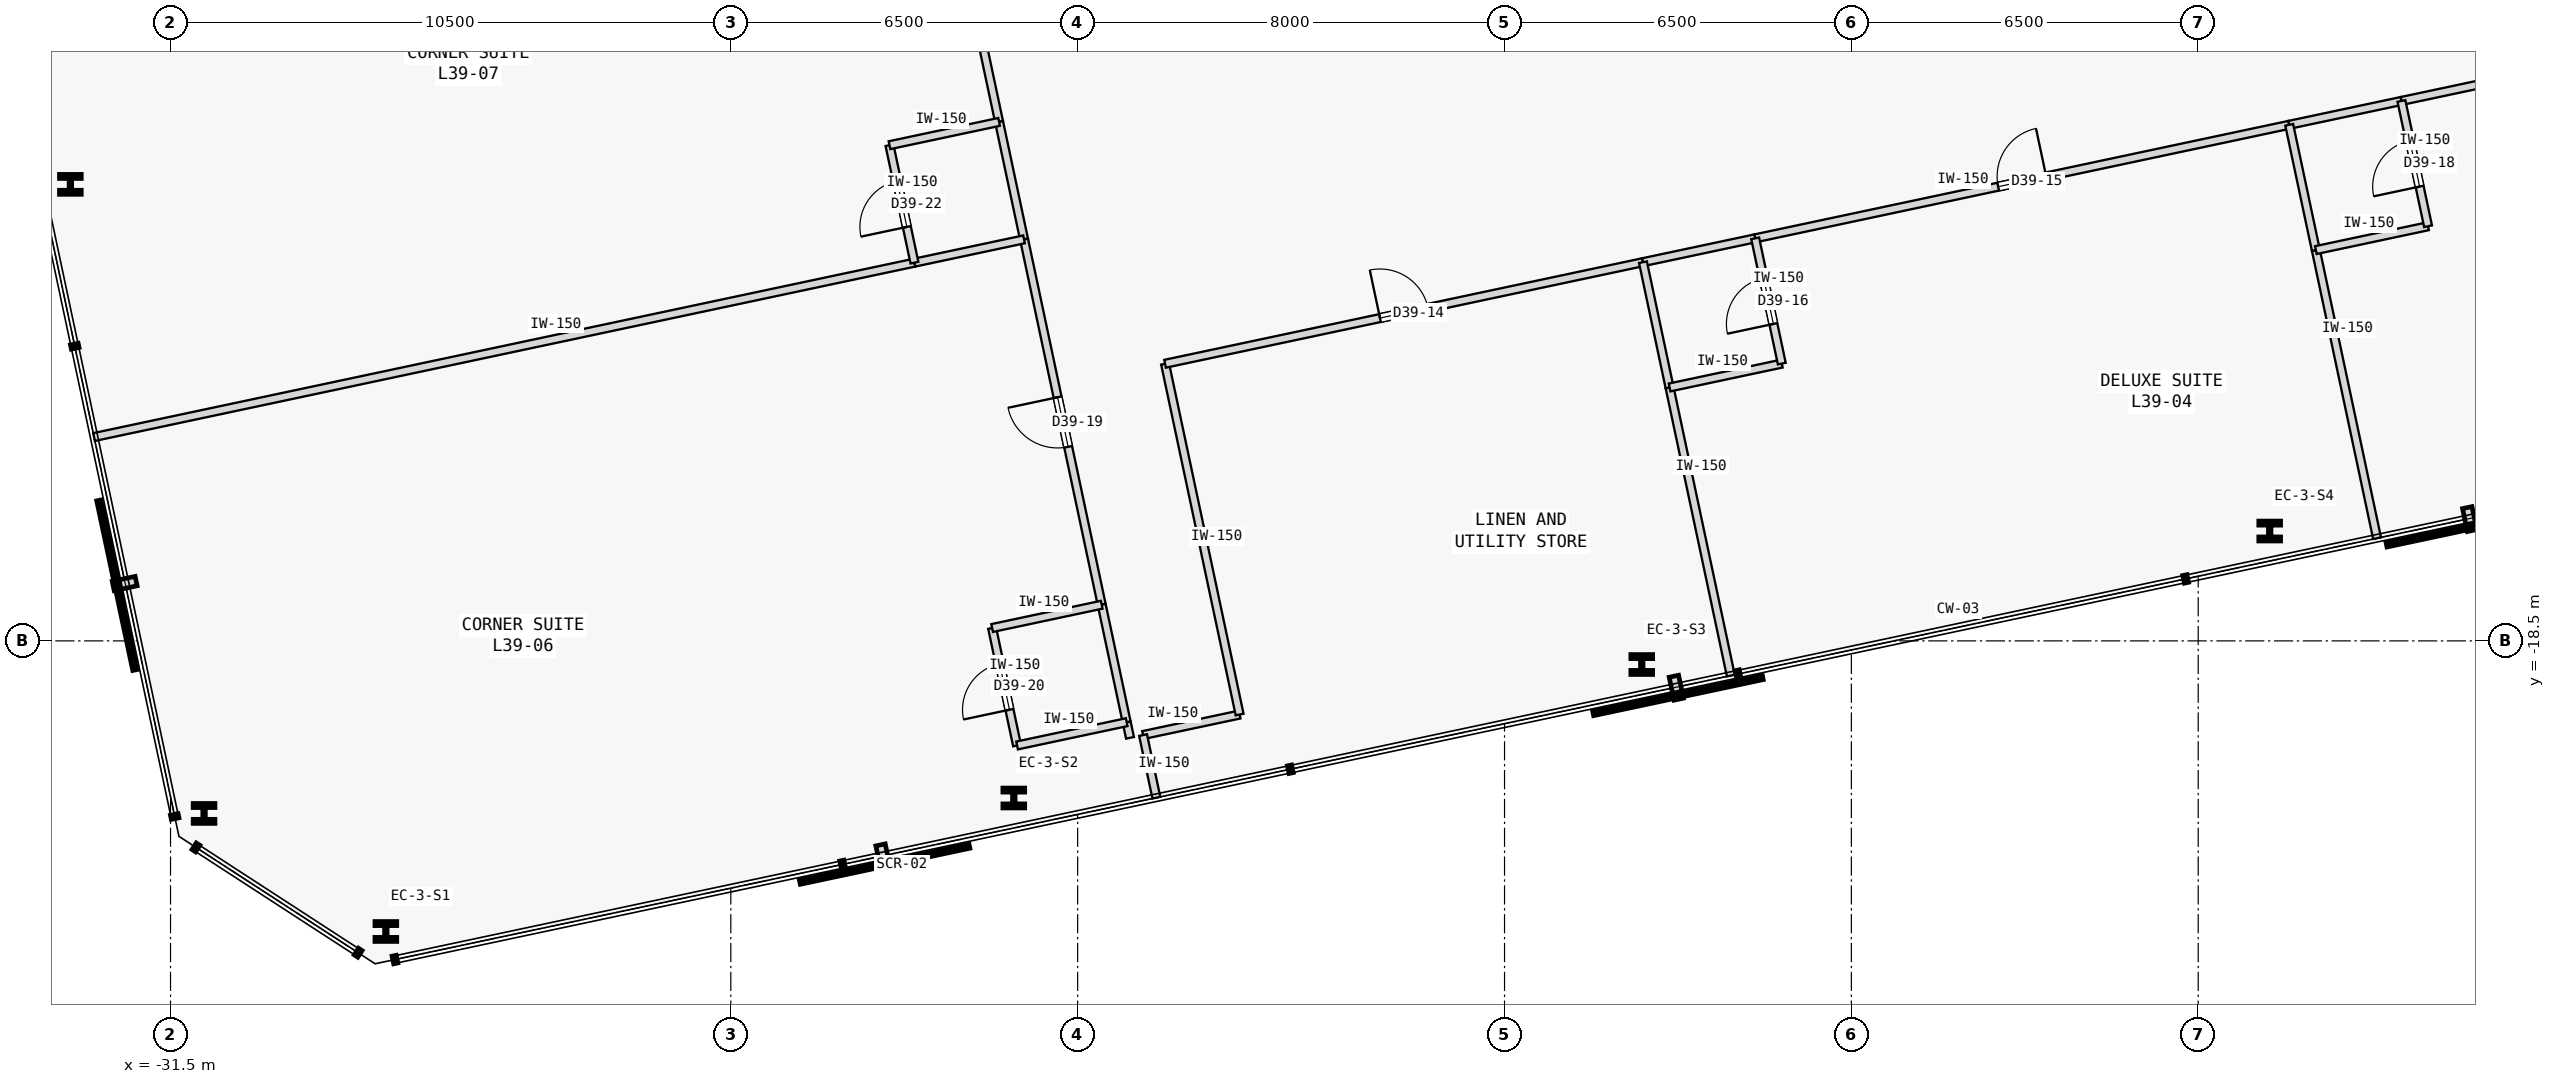
"""IFC4 building model, lengths in metres.
Left out: names, types, materials, properties, quantities, classifications, styles, units other than length and angle.
Written with IfcOpenShell. Run it as: python <this file> out.ifc"""

import sys

from ifc_helpers import new_model, si_unit, direction, frame, frame_2d, origin, origin_2d, place, context, subcontext, project, spatial, rectangle, i_section, extrude, element, fill, save


model = new_model("IFC4")
c1 = context("Model", 3, precision=1e-05, world=origin(), true_north=direction((0.0, 1.0)))
c2 = subcontext(c1, "Body", "Model", "MODEL_VIEW")
j1 = project(units=[si_unit("LENGTHUNIT", "METRE"), si_unit("PLANEANGLEUNIT", "RADIAN")], contexts=[c1])
p1 = place(None, origin())
s1 = spatial("IfcSite", under=j1, at=p1, CompositionType="ELEMENT")
p2 = place(p1, origin())
s2 = spatial("IfcBuilding", under=s1, at=p2, CompositionType="ELEMENT")
p3 = place(p2, frame((0.0, 0.0, 154.8)))
s3 = spatial("IfcBuildingStorey", under=s2, at=p3, CompositionType="ELEMENT", Elevation=154.8)
for number, where, z_axis, x_axis in (
    (1, (-27.465, -23.946, 0.0), (0.0, 0.0, 1.0), (1.0, 0.0, 0.0)),
    (2, (-15.697, -21.444, 0.0), (0.0, 0.0, 1.0), (1.0, 0.0, 0.0)),
    (3, (-3.928, -18.943, 0.0), (0.0, 0.0, 1.0), (1.0, 0.0, 0.0)),
    (4, (7.84, -16.441, 0.0), (0.0, 0.0, 1.0), (1.0, 0.0, 0.0)),
    (5, (-33.377, -9.945, 0.0), (0.0, 0.0, 1.0), (1.0, 0.0, 0.0)),
    (6, (-30.871, -21.733, 0.0), (0.0, 0.0, 1.0), (1.0, 0.0, 0.0)),
):
    element("IfcColumn", number, at=place(p3, frame(where, z_axis=z_axis, x_axis=x_axis)), inside=s3, PredefinedType="COLUMN", context=c2, shape_type="SweptSolid", body=[
        extrude(i_section(OverallWidth=0.409, OverallDepth=0.374, WebThickness=0.048, FlangeThickness=0.077, FilletRadius=0.015, at=origin_2d()), origin(), (0.0, 0.0, 1.0), 3.4),
    ])
p4 = place(p3, frame((-13.274, -20.265, 0.0), z_axis=(0.0, 0.0, 1.0), x_axis=(0.978160192495, 0.207852442415, 0.0)))
e7 = element("IfcWall", 7, at=p4, inside=s3, PredefinedType="PARTITIONING", context=c2, shape_type="SweptSolid", body=[
    extrude(rectangle(XDim=1.85, YDim=0.15, at=frame_2d((0.925, 0.0))), origin(), (0.0, 0.0, 1.0), 3.175),
])
p5 = place(p3, frame((-11.465, -19.88, 0.0), z_axis=(0.0, 0.0, 1.0), x_axis=(-0.207916109912, 0.978146661416, 0.0)))
e8 = element("IfcWall", 8, at=p5, inside=s3, PredefinedType="PARTITIONING", context=c2, shape_type="SweptSolid", body=[
    extrude(rectangle(XDim=6.72, YDim=0.15, at=frame_2d((3.36, 0.0))), origin(), (0.0, 0.0, 1.0), 3.175),
])
p6 = place(p3, frame((-12.862, -13.307, 0.0), z_axis=(0.0, 0.0, 1.0), x_axis=(0.978149904805, 0.207900850719, 0.0)))
e9 = element("IfcWall", 9, at=p6, inside=s3, PredefinedType="PARTITIONING", context=c2, shape_type="SweptSolid", body=[
    extrude(rectangle(XDim=9.156, YDim=0.15, at=frame_2d((4.578, 0.0))), origin(), (0.0, 0.0, 1.0), 3.175),
])
p7 = place(p6, frame((4.118, 0.0, 0.0)))
e10 = element("IfcOpeningElement", 10, at=p7, cuts=e9, PredefinedType="OPENING", context=c2, shape_type="SweptSolid", body=[
    extrude(rectangle(XDim=0.92, YDim=2.15, at=frame_2d((0.46, 1.075))), frame((0.0, 0.085, 0.0), z_axis=(0.0, -1.0, 0.0), x_axis=(1.0, 0.0, 0.0)), (0.0, 0.0, 1.0), 0.17),
])
p8 = place(p3, frame((-1.803, -10.957, 0.0), z_axis=(0.0, 0.0, 1.0), x_axis=(0.978145386425, 0.207922108048, 0.0)))
e11 = element("IfcWall", 11, at=p8, inside=s3, PredefinedType="PARTITIONING", context=c2, shape_type="SweptSolid", body=[
    extrude(rectangle(XDim=10.232, YDim=0.15, at=frame_2d((5.116, 0.0))), origin(), (0.0, 0.0, 1.0), 3.175),
])
p9 = place(p8, frame((4.656, 0.0, 0.0)))
e12 = element("IfcOpeningElement", 12, at=p9, cuts=e11, PredefinedType="OPENING", context=c2, shape_type="SweptSolid", body=[
    extrude(rectangle(XDim=0.92, YDim=2.15, at=frame_2d((0.46, 1.075))), frame((0.0, 0.085, 0.0), z_axis=(0.0, -1.0, 0.0), x_axis=(1.0, 0.0, 0.0)), (0.0, 0.0, 1.0), 0.17),
])
p10 = place(p3, frame((-3.906, -11.404, 0.0), z_axis=(0.0, 0.0, 1.0), x_axis=(0.978146728319, 0.207915795165, 0.0)))
e13 = element("IfcWall", 13, at=p10, inside=s3, PredefinedType="PARTITIONING", context=c2, shape_type="SweptSolid", body=[
    extrude(rectangle(XDim=2.15, YDim=0.15, at=frame_2d((1.075, 0.0))), origin(), (0.0, 0.0, 1.0), 3.175),
])
p11 = place(p3, frame((10.309, -8.382, 0.0), z_axis=(0.0, 0.0, 1.0), x_axis=(0.978149817889, 0.207901259648, 0.0)))
e14 = element("IfcWall", 14, at=p11, inside=s3, PredefinedType="PARTITIONING", context=c2, shape_type="SweptSolid", body=[
    extrude(rectangle(XDim=7.007, YDim=0.15, at=frame_2d((3.503, 0.0))), origin(), (0.0, 0.0, 1.0), 3.175),
])
p12 = place(p11, frame((3.043, 0.0, 0.0)))
e15 = element("IfcOpeningElement", 15, at=p12, cuts=e14, PredefinedType="OPENING", context=c2, shape_type="SweptSolid", body=[
    extrude(rectangle(XDim=0.92, YDim=2.15, at=frame_2d((0.46, 1.075))), frame((0.0, 0.085, 0.0), z_axis=(0.0, -1.0, 0.0), x_axis=(1.0, 0.0, 0.0)), (0.0, 0.0, 1.0), 0.17),
])
p13 = place(p3, frame((8.206, -8.829, 0.0), z_axis=(0.0, 0.0, 1.0), x_axis=(0.978146728319, 0.207915795165, 0.0)))
e16 = element("IfcWall", 16, at=p13, inside=s3, PredefinedType="PARTITIONING", context=c2, shape_type="SweptSolid", body=[
    extrude(rectangle(XDim=2.15, YDim=0.15, at=frame_2d((1.075, 0.0))), origin(), (0.0, 0.0, 1.0), 3.175),
])
p14 = place(p3, frame((-13.519, -20.317, 0.0), z_axis=(0.0, 0.0, 1.0), x_axis=(-0.207527808066, 0.978229118806, 0.0)))
e17 = element("IfcWall", 17, at=p14, inside=s3, PredefinedType="PARTITIONING", context=c2, shape_type="SweptSolid", body=[
    extrude(rectangle(XDim=0.3, YDim=0.15, at=frame_2d((0.15, 0.0))), origin(), (0.0, 0.0, 1.0), 3.175),
])
p15 = place(p3, frame((-14.049, -17.823, 0.0), z_axis=(0.0, 0.0, 1.0), x_axis=(-0.207940096132, 0.978141562567, 0.0)))
e18 = element("IfcWall", 18, at=p15, inside=s3, PredefinedType="PARTITIONING", context=c2, shape_type="SweptSolid", body=[
    extrude(rectangle(XDim=7.0, YDim=0.15, at=frame_2d((3.5, 0.0))), origin(), (0.0, 0.0, 1.0), 3.175),
])
p16 = place(p15, frame((3.025, 0.0, 0.0)))
e19 = element("IfcOpeningElement", 19, at=p16, cuts=e18, PredefinedType="OPENING", context=c2, shape_type="SweptSolid", body=[
    extrude(rectangle(XDim=0.95, YDim=2.15, at=frame_2d((0.475, 1.075))), frame((0.0, 0.085, 0.0), z_axis=(0.0, -1.0, 0.0), x_axis=(1.0, 0.0, 0.0)), (0.0, 0.0, 1.0), 0.17),
])
p17 = place(p3, frame((-13.581, -20.023, 0.0), z_axis=(0.0, 0.0, 1.0), x_axis=(-0.207891197838, 0.978151956427, 0.0)))
e20 = element("IfcWall", 20, at=p17, inside=s3, PredefinedType="PARTITIONING", context=c2, shape_type="SweptSolid", body=[
    extrude(rectangle(XDim=2.25, YDim=0.15, at=frame_2d((1.125, 0.0))), origin(), (0.0, 0.0, 1.0), 3.175),
])
p18 = place(p3, frame((-15.972, -8.775, 0.0), z_axis=(0.0, 0.0, 1.0), x_axis=(-0.207894825434, 0.97815118543, 0.0)))
e21 = element("IfcWall", 21, at=p18, inside=s3, PredefinedType="PARTITIONING", context=c2, shape_type="SweptSolid", body=[
    extrude(rectangle(XDim=8.5, YDim=0.15, at=frame_2d((4.25, 0.0))), origin(), (0.0, 0.0, 1.0), 3.175),
])
p19 = place(p18, frame((5.05, 0.0, 0.0)))
e22 = element("IfcOpeningElement", 22, at=p19, cuts=e21, PredefinedType="OPENING", context=c2, shape_type="SweptSolid", body=[
    extrude(rectangle(XDim=0.95, YDim=2.15, at=frame_2d((0.475, 1.075))), frame((0.0, 0.085, 0.0), z_axis=(0.0, -1.0, 0.0), x_axis=(1.0, 0.0, 0.0)), (0.0, 0.0, 1.0), 0.17),
])
p20 = place(p3, frame((-15.504, -10.976, 0.0), z_axis=(0.0, 0.0, 1.0), x_axis=(-0.207891197838, 0.978151956427, 0.0)))
e23 = element("IfcWall", 23, at=p20, inside=s3, PredefinedType="PARTITIONING", context=c2, shape_type="SweptSolid", body=[
    extrude(rectangle(XDim=2.25, YDim=0.15, at=frame_2d((1.125, 0.0))), origin(), (0.0, 0.0, 1.0), 3.175),
])
p21 = place(p3, frame((-2.259, -19.15, 0.0), z_axis=(0.0, 0.0, 1.0), x_axis=(-0.20791588359, 0.978146709523, 0.0)))
e24 = element("IfcWall", 24, at=p21, inside=s3, PredefinedType="PARTITIONING", context=c2, shape_type="SweptSolid", body=[
    extrude(rectangle(XDim=5.52, YDim=0.15, at=frame_2d((2.76, 0.0))), origin(), (0.0, 0.0, 1.0), 3.175),
])
p22 = place(p3, frame((-3.407, -13.751, 0.0), z_axis=(0.0, 0.0, 1.0), x_axis=(-0.207840504985, 0.978162729042, 0.0)))
e25 = element("IfcWall", 25, at=p22, inside=s3, PredefinedType="PARTITIONING", context=c2, shape_type="SweptSolid", body=[
    extrude(rectangle(XDim=2.4, YDim=0.15, at=frame_2d((1.2, 0.0))), origin(), (0.0, 0.0, 1.0), 3.175),
])
p23 = place(p3, frame((-13.025, -21.439, 0.0), z_axis=(0.0, 0.0, 1.0), x_axis=(-0.207917150959, 0.978146440129, 0.0)))
e26 = element("IfcWall", 26, at=p23, inside=s3, PredefinedType="PARTITIONING", context=c2, shape_type="SweptSolid", body=[
    extrude(rectangle(XDim=1.2, YDim=0.15, at=frame_2d((0.6, 0.0))), origin(), (0.0, 0.0, 1.0), 3.175),
])
p24 = place(p3, frame((-3.407, -13.751, 0.0), z_axis=(0.0, 0.0, 1.0), x_axis=(0.978151636287, 0.207892704126, 0.0)))
e27 = element("IfcWall", 27, at=p24, inside=s3, PredefinedType="PARTITIONING", context=c2, shape_type="SweptSolid", body=[
    extrude(rectangle(XDim=2.15, YDim=0.15, at=frame_2d((1.075, 0.0))), origin(), (0.0, 0.0, 1.0), 3.175),
])
p25 = place(p3, frame((-1.304, -13.304, 0.0), z_axis=(0.0, 0.0, 1.0), x_axis=(-0.207937840262, 0.978142042133, 0.0)))
e28 = element("IfcWall", 28, at=p25, inside=s3, PredefinedType="PARTITIONING", context=c2, shape_type="SweptSolid", body=[
    extrude(rectangle(XDim=2.4, YDim=0.15, at=frame_2d((1.2, 0.0))), origin(), (0.0, 0.0, 1.0), 3.175),
])
p26 = place(p25, frame((0.76, 0.0, 0.0)))
e29 = element("IfcOpeningElement", 29, at=p26, cuts=e28, PredefinedType="OPENING", context=c2, shape_type="SweptSolid", body=[
    extrude(rectangle(XDim=0.88, YDim=2.15, at=frame_2d((0.44, 1.075))), frame((0.0, 0.085, 0.0), z_axis=(0.0, -1.0, 0.0), x_axis=(1.0, 0.0, 0.0)), (0.0, 0.0, 1.0), 0.17),
])
p27 = place(p3, frame((9.852, -16.576, 0.0), z_axis=(0.0, 0.0, 1.0), x_axis=(-0.20792487872, 0.978144797466, 0.0)))
e30 = element("IfcWall", 30, at=p27, inside=s3, PredefinedType="PARTITIONING", context=c2, shape_type="SweptSolid", body=[
    extrude(rectangle(XDim=5.52, YDim=0.15, at=frame_2d((2.76, 0.0))), origin(), (0.0, 0.0, 1.0), 3.175),
])
p28 = place(p3, frame((8.705, -11.177, 0.0), z_axis=(0.0, 0.0, 1.0), x_axis=(-0.207917150959, 0.978146440129, 0.0)))
e31 = element("IfcWall", 31, at=p28, inside=s3, PredefinedType="PARTITIONING", context=c2, shape_type="SweptSolid", body=[
    extrude(rectangle(XDim=2.4, YDim=0.15, at=frame_2d((1.2, 0.0))), origin(), (0.0, 0.0, 1.0), 3.175),
])
p29 = place(p3, frame((8.705, -11.177, 0.0), z_axis=(0.0, 0.0, 1.0), x_axis=(0.978123629285, 0.208024435669, 0.0)))
e32 = element("IfcWall", 32, at=p29, inside=s3, PredefinedType="PARTITIONING", context=c2, shape_type="SweptSolid", body=[
    extrude(rectangle(XDim=2.15, YDim=0.15, at=frame_2d((1.075, 0.0))), origin(), (0.0, 0.0, 1.0), 3.175),
])
p30 = place(p3, frame((10.808, -10.729, 0.0), z_axis=(0.0, 0.0, 1.0), x_axis=(-0.207937840262, 0.978142042133, 0.0)))
e33 = element("IfcWall", 33, at=p30, inside=s3, PredefinedType="PARTITIONING", context=c2, shape_type="SweptSolid", body=[
    extrude(rectangle(XDim=2.4, YDim=0.15, at=frame_2d((1.2, 0.0))), origin(), (0.0, 0.0, 1.0), 3.175),
])
p31 = place(p30, frame((0.76, 0.0, 0.0)))
e34 = element("IfcOpeningElement", 34, at=p31, cuts=e33, PredefinedType="OPENING", context=c2, shape_type="SweptSolid", body=[
    extrude(rectangle(XDim=0.88, YDim=2.15, at=frame_2d((0.44, 1.075))), frame((0.0, 0.085, 0.0), z_axis=(0.0, -1.0, 0.0), x_axis=(1.0, 0.0, 0.0)), (0.0, 0.0, 1.0), 0.17),
])
p32 = place(p3, frame((-15.635, -20.46, 0.0), z_axis=(0.0, 0.0, 1.0), x_axis=(-0.207913264065, 0.978147266328, 0.0)))
e35 = element("IfcWall", 35, at=p32, inside=s3, PredefinedType="PARTITIONING", context=c2, shape_type="SweptSolid", body=[
    extrude(rectangle(XDim=2.25, YDim=0.15, at=frame_2d((1.125, 0.0))), origin(), (0.0, 0.0, 1.0), 3.175),
])
p33 = place(p32, frame((0.685, 0.0, 0.0)))
e36 = element("IfcOpeningElement", 36, at=p33, cuts=e35, PredefinedType="OPENING", context=c2, shape_type="SweptSolid", body=[
    extrude(rectangle(XDim=0.88, YDim=2.15, at=frame_2d((0.44, 1.075))), frame((0.0, 0.085, 0.0), z_axis=(0.0, -1.0, 0.0), x_axis=(1.0, 0.0, 0.0)), (0.0, 0.0, 1.0), 0.17),
])
for number, where, z_axis, x_axis in (
    (37, (-15.635, -20.46, 0.0), (0.0, 0.0, 1.0), (0.978, 0.208, 0.0)),
    (38, (-16.103, -18.259, 0.0), (0.0, 0.0, 1.0), (0.978, 0.208, 0.0)),
):
    element("IfcWall", number, at=place(p3, frame(where, z_axis=z_axis, x_axis=x_axis)), inside=s3, PredefinedType="PARTITIONING", context=c2, shape_type="SweptSolid", body=[
        extrude(rectangle(XDim=2.1, YDim=0.15, at=frame_2d((1.05, 0.0))), origin(), (0.0, 0.0, 1.0), 3.175),
    ])
p34 = place(p3, frame((-32.933, -14.68, 0.0), z_axis=(0.0, 0.0, 1.0), x_axis=(0.978146137903, 0.207918572776, 0.0)))
e39 = element("IfcWall", 39, at=p34, inside=s3, PredefinedType="PARTITIONING", context=c2, shape_type="SweptSolid", body=[
    extrude(rectangle(XDim=15.718, YDim=0.15, at=frame_2d((7.859, 0.0))), origin(), (0.0, 0.0, 1.0), 3.175),
])
p35 = place(p3, frame((-17.558, -11.412, 0.0), z_axis=(0.0, 0.0, 1.0), x_axis=(0.978153236239, 0.207885176084, 0.0)))
e40 = element("IfcWall", 40, at=p35, inside=s3, PredefinedType="PARTITIONING", context=c2, shape_type="SweptSolid", body=[
    extrude(rectangle(XDim=2.1, YDim=0.15, at=frame_2d((1.05, 0.0))), origin(), (0.0, 0.0, 1.0), 3.175),
])
p36 = place(p3, frame((-17.558, -11.412, 0.0), z_axis=(0.0, 0.0, 1.0), x_axis=(-0.207891197838, 0.978151956427, 0.0)))
e41 = element("IfcWall", 41, at=p36, inside=s3, PredefinedType="PARTITIONING", context=c2, shape_type="SweptSolid", body=[
    extrude(rectangle(XDim=2.25, YDim=0.15, at=frame_2d((1.125, 0.0))), origin(), (0.0, 0.0, 1.0), 3.175),
])
p37 = place(p36, frame((0.685, 0.0, 0.0)))
e42 = element("IfcOpeningElement", 42, at=p37, cuts=e41, PredefinedType="OPENING", context=c2, shape_type="SweptSolid", body=[
    extrude(rectangle(XDim=0.88, YDim=2.15, at=frame_2d((0.44, 1.075))), frame((0.0, 0.085, 0.0), z_axis=(0.0, -1.0, 0.0), x_axis=(1.0, 0.0, 0.0)), (0.0, 0.0, 1.0), 0.17),
])
p38 = place(p3, frame((-18.026, -9.211, 0.0), z_axis=(0.0, 0.0, 1.0), x_axis=(0.978153236239, 0.207885176084, 0.0)))
e43 = element("IfcWall", 43, at=p38, inside=s3, PredefinedType="PARTITIONING", context=c2, shape_type="SweptSolid", body=[
    extrude(rectangle(XDim=2.1, YDim=0.15, at=frame_2d((1.05, 0.0))), origin(), (0.0, 0.0, 1.0), 3.175),
])
p39 = place(p7, origin())
e44 = element("IfcDoor", 44, at=p39, inside=s3, OperationType="SINGLE_SWING_LEFT", PredefinedType="DOOR", context=c2, shape_type="SweptSolid", body=[
    extrude(rectangle(XDim=0.92, YDim=2.15, at=frame_2d((0.46, 1.075))), frame((0.0, 0.025, 0.0), z_axis=(0.0, -1.0, 0.0), x_axis=(1.0, 0.0, 0.0)), (0.0, 0.0, 1.0), 0.05),
])
fill(e10, e44)
p40 = place(p9, origin())
e45 = element("IfcDoor", 45, at=p40, inside=s3, OperationType="SINGLE_SWING_RIGHT", PredefinedType="DOOR", context=c2, shape_type="SweptSolid", body=[
    extrude(rectangle(XDim=0.92, YDim=2.15, at=frame_2d((0.46, 1.075))), frame((0.0, 0.025, 0.0), z_axis=(0.0, -1.0, 0.0), x_axis=(1.0, 0.0, 0.0)), (0.0, 0.0, 1.0), 0.05),
])
fill(e12, e45)
p41 = place(p26, origin())
e46 = element("IfcDoor", 46, at=p41, inside=s3, OperationType="SINGLE_SWING_LEFT", PredefinedType="DOOR", context=c2, shape_type="SweptSolid", body=[
    extrude(rectangle(XDim=0.88, YDim=2.15, at=frame_2d((0.44, 1.075))), frame((0.0, 0.025, 0.0), z_axis=(0.0, -1.0, 0.0), x_axis=(1.0, 0.0, 0.0)), (0.0, 0.0, 1.0), 0.05),
])
fill(e29, e46)
p42 = place(p31, origin())
e47 = element("IfcDoor", 47, at=p42, inside=s3, OperationType="SINGLE_SWING_LEFT", PredefinedType="DOOR", context=c2, shape_type="SweptSolid", body=[
    extrude(rectangle(XDim=0.88, YDim=2.15, at=frame_2d((0.44, 1.075))), frame((0.0, 0.025, 0.0), z_axis=(0.0, -1.0, 0.0), x_axis=(1.0, 0.0, 0.0)), (0.0, 0.0, 1.0), 0.05),
])
fill(e34, e47)
p43 = place(p16, origin())
e48 = element("IfcDoor", 48, at=p43, inside=s3, OperationType="SINGLE_SWING_RIGHT", PredefinedType="DOOR", context=c2, shape_type="SweptSolid", body=[
    extrude(rectangle(XDim=0.95, YDim=2.15, at=frame_2d((0.475, 1.075))), frame((0.0, 0.025, 0.0), z_axis=(0.0, -1.0, 0.0), x_axis=(1.0, 0.0, 0.0)), (0.0, 0.0, 1.0), 0.05),
])
fill(e19, e48)
p44 = place(p33, origin())
e49 = element("IfcDoor", 49, at=p44, inside=s3, OperationType="SINGLE_SWING_LEFT", PredefinedType="DOOR", context=c2, shape_type="SweptSolid", body=[
    extrude(rectangle(XDim=0.88, YDim=2.15, at=frame_2d((0.44, 1.075))), frame((0.0, 0.025, 0.0), z_axis=(0.0, -1.0, 0.0), x_axis=(1.0, 0.0, 0.0)), (0.0, 0.0, 1.0), 0.05),
])
fill(e36, e49)
p45 = place(p37, origin())
e50 = element("IfcDoor", 50, at=p45, inside=s3, OperationType="SINGLE_SWING_LEFT", PredefinedType="DOOR", context=c2, shape_type="SweptSolid", body=[
    extrude(rectangle(XDim=0.88, YDim=2.15, at=frame_2d((0.44, 1.075))), frame((0.0, 0.025, 0.0), z_axis=(0.0, -1.0, 0.0), x_axis=(1.0, 0.0, 0.0)), (0.0, 0.0, 1.0), 0.05),
])
fill(e42, e50)
save(model, sys.argv[1])
